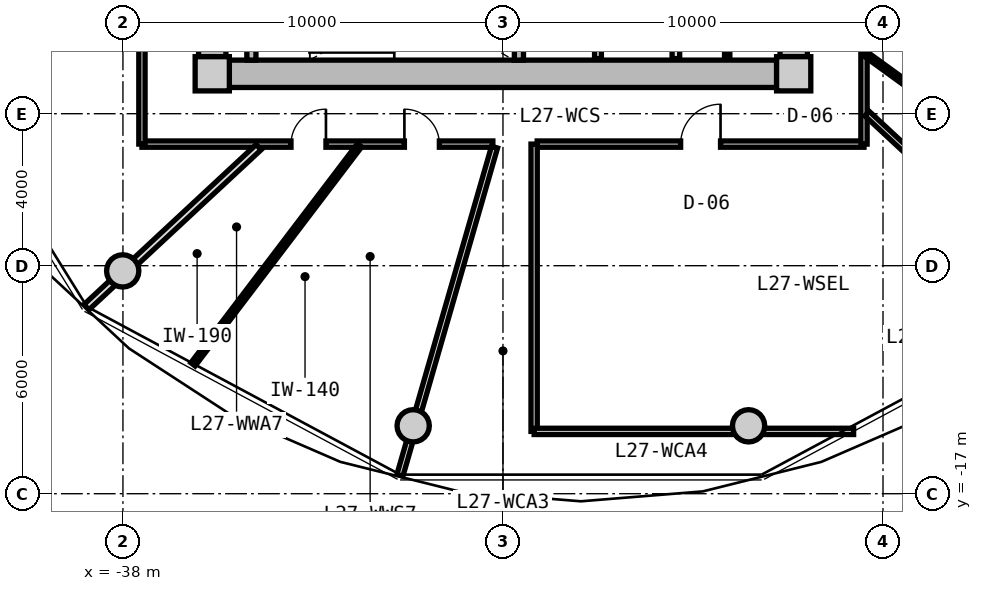
"""IFC4 building model, lengths in metres.
Left out: names, types, materials, properties, quantities, classifications, styles, units other than length and angle.
Written with IfcOpenShell. Run it as: python <this file> out.ifc"""

import sys

from ifc_helpers import new_model, si_unit, direction, frame, frame_2d, origin, origin_2d, place, context, subcontext, project, spatial, rectangle, circle, extrude, source, transform, mapped, element, fill, save


model = new_model("IFC4")
c1 = context("Model", 3, precision=1e-05, world=origin(), true_north=direction((0.0, 1.0)))
c2 = subcontext(c1, "Body", "Model", "MODEL_VIEW")
j1 = project(units=[si_unit("LENGTHUNIT", "METRE"), si_unit("PLANEANGLEUNIT", "RADIAN")], contexts=[c1])
p1 = place(None, origin())
s1 = spatial("IfcSite", under=j1, at=p1, CompositionType="ELEMENT")
p2 = place(p1, origin())
s2 = spatial("IfcBuilding", under=s1, at=p2, CompositionType="ELEMENT")
p3 = place(p2, frame((0.0, 0.0, 90.15)))
s3 = spatial("IfcBuildingStorey", under=s2, at=p3, CompositionType="ELEMENT", Elevation=90.15)
m1 = source(origin(), c2, "Body", "SweptSolid", [
    extrude(rectangle(XDim=0.9, YDim=0.9, at=origin_2d()), origin(), (0.0, 0.0, 1.0), 3.05),
])
for number, where, z_axis, x_axis in (
    (1, (-35.65, -5.95, 0.0), (0.0, 0.0, 1.0), (1.0, 0.0, 0.0)),
    (2, (-20.35, -5.95, 0.0), (0.0, 0.0, 1.0), (1.0, 0.0, 0.0)),
):
    element("IfcColumn", number, at=place(p3, frame(where, z_axis=z_axis, x_axis=x_axis)), inside=s3, PredefinedType="COLUMN", context=c2, shape_type="MappedRepresentation", body=[
        mapped(m1, transform((0.0, 0.0, 0.0), x_axis=(1.0, 0.0, 0.0), y_axis=(0.0, 1.0, 0.0), z_axis=(0.0, 0.0, 1.0), scale=1.0)),
    ])
m2 = source(origin(), c2, "Body", "SweptSolid", [
    extrude(rectangle(XDim=14.4, YDim=0.72, at=frame_2d((7.2, 0.0))), origin(), (0.0, 0.0, 1.0), 2.79),
])
p4 = place(p3, frame((-20.8, -5.95, 0.0), z_axis=(0.0, 0.0, 1.0), x_axis=(-1.0, 0.0, 0.0)))
e3 = element("IfcWall", 3, at=p4, inside=s3, PredefinedType="SHEAR", context=c2, shape_type="MappedRepresentation", body=[
    mapped(m2, transform((0.0, 0.0, 0.0), x_axis=(1.0, 0.0, 0.0), y_axis=(0.0, 1.0, 0.0), z_axis=(0.0, 0.0, 1.0), scale=1.0)),
])
m3 = source(origin(), c2, "Body", "SweptSolid", [
    extrude(rectangle(XDim=11.0, YDim=0.72, at=frame_2d((5.5, 0.0))), origin(), (0.0, 0.0, 1.0), 2.79),
])
p5 = place(p3, frame((-35.65, -5.5, 0.0), z_axis=(0.0, 0.0, 1.0), x_axis=(0.0, 1.0, 0.0)))
e4 = element("IfcWall", 4, at=p5, inside=s3, PredefinedType="SHEAR", context=c2, shape_type="MappedRepresentation", body=[
    mapped(m3, transform((0.0, 0.0, 0.0), x_axis=(1.0, 0.0, 0.0), y_axis=(0.0, 1.0, 0.0), z_axis=(0.0, 0.0, 1.0), scale=1.0)),
])
p6 = place(p5, frame((3.8, 0.0, 0.0)))
e5 = element("IfcOpeningElement", 5, at=p6, cuts=e4, PredefinedType="OPENING", context=c2, shape_type="SweptSolid", body=[
    extrude(rectangle(XDim=1.2, YDim=2.15, at=frame_2d((0.6, 1.075))), frame((0.0, 0.37, 0.0), z_axis=(0.0, -1.0, 0.0), x_axis=(1.0, 0.0, 0.0)), (0.0, 0.0, 1.0), 0.74),
])
p7 = place(p3, frame((-20.35, 5.5, 0.0), z_axis=(0.0, 0.0, 1.0), x_axis=(0.0, -1.0, 0.0)))
e6 = element("IfcWall", 6, at=p7, inside=s3, PredefinedType="SHEAR", context=c2, shape_type="MappedRepresentation", body=[
    mapped(m3, transform((0.0, 0.0, 0.0), x_axis=(1.0, 0.0, 0.0), y_axis=(0.0, 1.0, 0.0), z_axis=(0.0, 0.0, 1.0), scale=1.0)),
])
p8 = place(p7, frame((5.65, 0.0, 0.0)))
e7 = element("IfcOpeningElement", 7, at=p8, cuts=e6, PredefinedType="OPENING", context=c2, shape_type="SweptSolid", body=[
    extrude(rectangle(XDim=1.2, YDim=2.15, at=frame_2d((0.6, 1.075))), frame((0.0, 0.37, 0.0), z_axis=(0.0, -1.0, 0.0), x_axis=(1.0, 0.0, 0.0)), (0.0, 0.0, 1.0), 0.74),
])
m4 = source(origin(), c2, "Body", "SweptSolid", [
    extrude(circle(Radius=0.425, at=origin_2d()), origin(), (0.0, 0.0, 1.0), 3.05),
])
for number, where, z_axis, x_axis in (
    (8, (-38.006, -11.137, 0.0), (0.0, 0.0, 1.0), (1.0, 0.0, 0.0)),
    (9, (-30.363, -15.213, 0.0), (0.0, 0.0, 1.0), (1.0, 0.0, 0.0)),
    (10, (-21.537, -15.213, 0.0), (0.0, 0.0, 1.0), (1.0, 0.0, 0.0)),
):
    element("IfcColumn", number, at=place(p3, frame(where, z_axis=z_axis, x_axis=x_axis)), inside=s3, PredefinedType="COLUMN", context=c2, shape_type="MappedRepresentation", body=[
        mapped(m4, transform((0.0, 0.0, 0.0), x_axis=(1.0, 0.0, 0.0), y_axis=(0.0, 1.0, 0.0), z_axis=(0.0, 0.0, 1.0), scale=1.0)),
    ])
m5 = source(origin(), c2, "Body", "SweptSolid", [
    extrude(rectangle(XDim=3.14, YDim=0.24, at=frame_2d((1.57, 0.0))), origin(), (0.0, 0.0, 1.0), 2.79),
])
for number, where, z_axis, x_axis in (
    (11, (-34.62, -5.59, 0.0), (0.0, 0.0, 1.0), (0.0, 1.0, 0.0)),
    (12, (-27.58, -5.59, 0.0), (0.0, 0.0, 1.0), (0.0, 1.0, 0.0)),
):
    element("IfcWall", number, at=place(p3, frame(where, z_axis=z_axis, x_axis=x_axis)), inside=s3, PredefinedType="PARTITIONING", context=c2, shape_type="MappedRepresentation", body=[
        mapped(m5, transform((0.0, 0.0, 0.0), x_axis=(1.0, 0.0, 0.0), y_axis=(0.0, 1.0, 0.0), z_axis=(0.0, 0.0, 1.0), scale=1.0)),
    ])
m6 = source(origin(), c2, "Body", "SweptSolid", [
    extrude(rectangle(XDim=3.8, YDim=0.2, at=frame_2d((1.9, 0.0))), origin(), (0.0, 0.0, 1.0), 2.775),
])
p9 = place(p3, frame((-23.45, -5.55, 0.0), z_axis=(0.0, 0.0, 1.0), x_axis=(0.0, 1.0, 0.0)))
e13 = element("IfcWall", 13, at=p9, inside=s3, PredefinedType="PARTITIONING", context=c2, shape_type="MappedRepresentation", body=[
    mapped(m6, transform((0.0, 0.0, 0.0), x_axis=(1.0, 0.0, 0.0), y_axis=(0.0, 1.0, 0.0), z_axis=(0.0, 0.0, 1.0), scale=1.0)),
])
m7 = source(origin(), c2, "Body", "SweptSolid", [
    extrude(rectangle(XDim=3.22, YDim=0.18, at=frame_2d((1.61, 0.0))), origin(), (0.0, 0.0, 1.0), 2.775),
])
p10 = place(p3, frame((-25.5, -5.55, 0.0), z_axis=(0.0, 0.0, 1.0), x_axis=(0.0, 1.0, 0.0)))
e14 = element("IfcWall", 14, at=p10, inside=s3, PredefinedType="PARTITIONING", context=c2, shape_type="MappedRepresentation", body=[
    mapped(m7, transform((0.0, 0.0, 0.0), x_axis=(1.0, 0.0, 0.0), y_axis=(0.0, 1.0, 0.0), z_axis=(0.0, 0.0, 1.0), scale=1.0)),
])
m8 = source(origin(), c2, "Body", "SweptSolid", [
    extrude(rectangle(XDim=3.8, YDim=0.14, at=frame_2d((1.9, 0.0))), origin(), (0.0, 0.0, 1.0), 2.775),
])
p11 = place(p3, frame((-22.1, -5.55, 0.0), z_axis=(0.0, 0.0, 1.0), x_axis=(0.0, 1.0, 0.0)))
e15 = element("IfcWall", 15, at=p11, inside=s3, PredefinedType="PARTITIONING", context=c2, shape_type="MappedRepresentation", body=[
    mapped(m8, transform((0.0, 0.0, 0.0), x_axis=(1.0, 0.0, 0.0), y_axis=(0.0, 1.0, 0.0), z_axis=(0.0, 0.0, 1.0), scale=1.0)),
])
m9 = source(origin(), c2, "Body", "SweptSolid", [
    extrude(rectangle(XDim=8.6, YDim=0.165, at=frame_2d((4.3, 0.0))), origin(), (0.0, 0.0, 1.0), 2.775),
])
p12 = place(p3, frame((-18.5, -7.8, 0.0), z_axis=(0.0, 0.0, 1.0), x_axis=(-1.0, 0.0, 0.0)))
e16 = element("IfcWall", 16, at=p12, inside=s3, PredefinedType="PARTITIONING", context=c2, shape_type="MappedRepresentation", body=[
    mapped(m9, transform((0.0, 0.0, 0.0), x_axis=(1.0, 0.0, 0.0), y_axis=(0.0, 1.0, 0.0), z_axis=(0.0, 0.0, 1.0), scale=1.0)),
])
p13 = place(p12, frame((3.775, 0.0, 0.0)))
e17 = element("IfcOpeningElement", 17, at=p13, cuts=e16, PredefinedType="OPENING", context=c2, shape_type="SweptSolid", body=[
    extrude(rectangle(XDim=1.05, YDim=2.15, at=frame_2d((0.525, 1.075))), frame((0.0, 0.093, 0.0), z_axis=(0.0, -1.0, 0.0), x_axis=(1.0, 0.0, 0.0)), (0.0, 0.0, 1.0), 0.185),
])
m10 = source(origin(), c2, "Body", "SweptSolid", [
    extrude(rectangle(XDim=9.234, YDim=0.165, at=frame_2d((4.617, 0.0))), origin(), (0.0, 0.0, 1.0), 2.775),
])
p14 = place(p3, frame((-28.266, -7.8, 0.0), z_axis=(0.0, 0.0, 1.0), x_axis=(-1.0, 0.0, 0.0)))
e18 = element("IfcWall", 18, at=p14, inside=s3, PredefinedType="PARTITIONING", context=c2, shape_type="MappedRepresentation", body=[
    mapped(m10, transform((0.0, 0.0, 0.0), x_axis=(1.0, 0.0, 0.0), y_axis=(0.0, 1.0, 0.0), z_axis=(0.0, 0.0, 1.0), scale=1.0)),
])
p15 = place(p14, frame((4.392, 0.0, 0.0)))
e19 = element("IfcOpeningElement", 19, at=p15, cuts=e18, PredefinedType="OPENING", context=c2, shape_type="SweptSolid", body=[
    extrude(rectangle(XDim=0.92, YDim=2.1, at=frame_2d((0.46, 1.05))), frame((0.0, 0.093, 0.0), z_axis=(0.0, -1.0, 0.0), x_axis=(1.0, 0.0, 0.0)), (0.0, 0.0, 1.0), 0.185),
])
p16 = place(p14, frame((1.408, 0.0, 0.0)))
e20 = element("IfcOpeningElement", 20, at=p16, cuts=e18, PredefinedType="OPENING", context=c2, shape_type="SweptSolid", body=[
    extrude(rectangle(XDim=0.92, YDim=2.1, at=frame_2d((0.46, 1.05))), frame((0.0, 0.093, 0.0), z_axis=(0.0, -1.0, 0.0), x_axis=(1.0, 0.0, 0.0)), (0.0, 0.0, 1.0), 0.185),
])
m11 = source(origin(), c2, "Body", "SweptSolid", [
    extrude(rectangle(XDim=15.6, YDim=0.165, at=frame_2d((7.8, 0.0))), origin(), (0.0, 0.0, 1.0), 2.775),
])
p17 = place(p3, frame((-37.5, -7.8, 0.0), z_axis=(0.0, 0.0, 1.0), x_axis=(0.0, 1.0, 0.0)))
e21 = element("IfcWall", 21, at=p17, inside=s3, PredefinedType="PARTITIONING", context=c2, shape_type="MappedRepresentation", body=[
    mapped(m11, transform((0.0, 0.0, 0.0), x_axis=(1.0, 0.0, 0.0), y_axis=(0.0, 1.0, 0.0), z_axis=(0.0, 0.0, 1.0), scale=1.0)),
])
p18 = place(p17, frame((7.175, 0.0, 0.0)))
e22 = element("IfcOpeningElement", 22, at=p18, cuts=e21, PredefinedType="OPENING", context=c2, shape_type="SweptSolid", body=[
    extrude(rectangle(XDim=1.25, YDim=2.2, at=frame_2d((0.625, 1.1))), frame((0.0, 0.093, 0.0), z_axis=(0.0, -1.0, 0.0), x_axis=(1.0, 0.0, 0.0)), (0.0, 0.0, 1.0), 0.185),
])
p19 = place(p3, frame((-18.5, 7.8, 0.0), z_axis=(0.0, 0.0, 1.0), x_axis=(0.0, -1.0, 0.0)))
e23 = element("IfcWall", 23, at=p19, inside=s3, PredefinedType="PARTITIONING", context=c2, shape_type="MappedRepresentation", body=[
    mapped(m11, transform((0.0, 0.0, 0.0), x_axis=(1.0, 0.0, 0.0), y_axis=(0.0, 1.0, 0.0), z_axis=(0.0, 0.0, 1.0), scale=1.0)),
])
p20 = place(p19, frame((12.002, 0.0, 0.0)))
e24 = element("IfcOpeningElement", 24, at=p20, cuts=e23, PredefinedType="OPENING", context=c2, shape_type="SweptSolid", body=[
    extrude(rectangle(XDim=1.05, YDim=2.15, at=frame_2d((0.525, 1.075))), frame((0.0, 0.093, 0.0), z_axis=(0.0, -1.0, 0.0), x_axis=(1.0, 0.0, 0.0)), (0.0, 0.0, 1.0), 0.185),
])
p21 = place(p19, frame((10.211, 0.0, 0.0)))
e25 = element("IfcOpeningElement", 25, at=p21, cuts=e23, PredefinedType="OPENING", context=c2, shape_type="SweptSolid", body=[
    extrude(rectangle(XDim=1.05, YDim=2.15, at=frame_2d((0.525, 1.075))), frame((0.0, 0.093, 0.0), z_axis=(0.0, -1.0, 0.0), x_axis=(1.0, 0.0, 0.0)), (0.0, 0.0, 1.0), 0.185),
])
p22 = place(p19, frame((7.722, 0.0, 0.0)))
e26 = element("IfcOpeningElement", 26, at=p22, cuts=e23, PredefinedType="OPENING", context=c2, shape_type="SweptSolid", body=[
    extrude(rectangle(XDim=1.05, YDim=2.15, at=frame_2d((0.525, 1.075))), frame((0.0, 0.093, 0.0), z_axis=(0.0, -1.0, 0.0), x_axis=(1.0, 0.0, 0.0)), (0.0, 0.0, 1.0), 0.185),
])
p23 = place(p19, frame((6.291, 0.0, 0.0)))
e27 = element("IfcOpeningElement", 27, at=p23, cuts=e23, PredefinedType="OPENING", context=c2, shape_type="SweptSolid", body=[
    extrude(rectangle(XDim=1.05, YDim=2.15, at=frame_2d((0.525, 1.075))), frame((0.0, 0.093, 0.0), z_axis=(0.0, -1.0, 0.0), x_axis=(1.0, 0.0, 0.0)), (0.0, 0.0, 1.0), 0.185),
])
p24 = place(p19, frame((4.296, 0.0, 0.0)))
e28 = element("IfcOpeningElement", 28, at=p24, cuts=e23, PredefinedType="OPENING", context=c2, shape_type="SweptSolid", body=[
    extrude(rectangle(XDim=1.05, YDim=2.15, at=frame_2d((0.525, 1.075))), frame((0.0, 0.093, 0.0), z_axis=(0.0, -1.0, 0.0), x_axis=(1.0, 0.0, 0.0)), (0.0, 0.0, 1.0), 0.185),
])
p25 = place(p19, frame((1.654, 0.0, 0.0)))
e29 = element("IfcOpeningElement", 29, at=p25, cuts=e23, PredefinedType="OPENING", context=c2, shape_type="SweptSolid", body=[
    extrude(rectangle(XDim=1.05, YDim=2.15, at=frame_2d((0.525, 1.075))), frame((0.0, 0.093, 0.0), z_axis=(0.0, -1.0, 0.0), x_axis=(1.0, 0.0, 0.0)), (0.0, 0.0, 1.0), 0.185),
])
m12 = source(origin(), c2, "Body", "SweptSolid", [
    extrude(rectangle(XDim=8.989, YDim=0.165, at=frame_2d((4.495, 0.0))), origin(), (0.0, 0.0, 1.0), 2.275),
])
p26 = place(p3, frame((-28.222, -7.88, 0.0), z_axis=(0.0, 0.0, 1.0), x_axis=(-0.27702323008, -0.960863221274, 0.0)))
e30 = element("IfcWall", 30, at=p26, inside=s3, PredefinedType="PARTITIONING", context=c2, shape_type="MappedRepresentation", body=[
    mapped(m12, transform((0.0, 0.0, 0.0), x_axis=(1.0, 0.0, 0.0), y_axis=(0.0, 1.0, 0.0), z_axis=(0.0, 0.0, 1.0), scale=1.0)),
])
m13 = source(origin(), c2, "Body", "SweptSolid", [
    extrude(rectangle(XDim=7.482, YDim=0.165, at=frame_2d((3.741, 0.0))), origin(), (0.0, 0.0, 1.0), 2.275),
])
p27 = place(p3, frame((-18.42, -6.998, 0.0), z_axis=(0.0, 0.0, 1.0), x_axis=(0.732508698043, -0.680757671489, 0.0)))
e31 = element("IfcWall", 31, at=p27, inside=s3, PredefinedType="PARTITIONING", context=c2, shape_type="MappedRepresentation", body=[
    mapped(m13, transform((0.0, 0.0, 0.0), x_axis=(1.0, 0.0, 0.0), y_axis=(0.0, 1.0, 0.0), z_axis=(0.0, 0.0, 1.0), scale=1.0)),
])
m14 = source(origin(), c2, "Body", "SweptSolid", [
    extrude(rectangle(XDim=7.56, YDim=0.165, at=frame_2d((3.78, 0.0))), origin(), (0.0, 0.0, 1.0), 2.775),
])
p28 = place(p3, frame((-27.18, -15.36, 0.0), z_axis=(0.0, 0.0, 1.0), x_axis=(0.0, 1.0, 0.0)))
e32 = element("IfcWall", 32, at=p28, inside=s3, PredefinedType="PARTITIONING", context=c2, shape_type="MappedRepresentation", body=[
    mapped(m14, transform((0.0, 0.0, 0.0), x_axis=(1.0, 0.0, 0.0), y_axis=(0.0, 1.0, 0.0), z_axis=(0.0, 0.0, 1.0), scale=1.0)),
])
m15 = source(origin(), c2, "Body", "SweptSolid", [
    extrude(rectangle(XDim=8.407, YDim=0.165, at=frame_2d((4.204, 0.0))), origin(), (0.0, 0.0, 1.0), 2.275),
])
p29 = place(p3, frame((-27.18, -15.36, 0.0), z_axis=(0.0, 0.0, 1.0), x_axis=(1.0, 0.0, 0.0)))
e33 = element("IfcWall", 33, at=p29, inside=s3, PredefinedType="PARTITIONING", context=c2, shape_type="MappedRepresentation", body=[
    mapped(m15, transform((0.0, 0.0, 0.0), x_axis=(1.0, 0.0, 0.0), y_axis=(0.0, 1.0, 0.0), z_axis=(0.0, 0.0, 1.0), scale=1.0)),
])
m16 = source(origin(), c2, "Body", "SweptSolid", [
    extrude(rectangle(XDim=6.187, YDim=0.19, at=frame_2d((3.093, 0.0))), origin(), (0.0, 0.0, 1.0), 2.275),
])
p30 = place(p3, frame((-34.429, -7.88, 0.0), z_axis=(0.0, 0.0, 1.0), x_axis=(-0.732501077882, -0.680765870841, 0.0)))
e34 = element("IfcWall", 34, at=p30, inside=s3, PredefinedType="PARTITIONING", context=c2, shape_type="MappedRepresentation", body=[
    mapped(m16, transform((0.0, 0.0, 0.0), x_axis=(1.0, 0.0, 0.0), y_axis=(0.0, 1.0, 0.0), z_axis=(0.0, 0.0, 1.0), scale=1.0)),
])
m17 = source(origin(), c2, "Body", "SweptSolid", [
    extrude(rectangle(XDim=7.243, YDim=0.14, at=frame_2d((3.621, 0.0))), origin(), (0.0, 0.0, 1.0), 2.775),
])
p31 = place(p3, frame((-31.774, -7.83, 0.0), z_axis=(0.0, 0.0, 1.0), x_axis=(-0.605111472002, -0.796140757939, 0.0)))
e35 = element("IfcWall", 35, at=p31, inside=s3, PredefinedType="PARTITIONING", context=c2, shape_type="MappedRepresentation", body=[
    mapped(m17, transform((0.0, 0.0, 0.0), x_axis=(1.0, 0.0, 0.0), y_axis=(0.0, 1.0, 0.0), z_axis=(0.0, 0.0, 1.0), scale=1.0)),
])
m18 = source(origin(), c2, "Body", "SweptSolid", [
    extrude(rectangle(XDim=8.744, YDim=0.19, at=frame_2d((4.372, 0.0))), origin(), (0.0, 0.0, 1.0), 2.775),
])
p32 = place(p3, frame((-18.273, -4.142, 0.0), z_axis=(0.0, 0.0, 1.0), x_axis=(0.882252449936, -0.470776607938, 0.0)))
e36 = element("IfcWall", 36, at=p32, inside=s3, PredefinedType="PARTITIONING", context=c2, shape_type="MappedRepresentation", body=[
    mapped(m18, transform((0.0, 0.0, 0.0), x_axis=(1.0, 0.0, 0.0), y_axis=(0.0, 1.0, 0.0), z_axis=(0.0, 0.0, 1.0), scale=1.0)),
])
m19 = source(origin(), c2, "Body", "SweptSolid", [
    extrude(rectangle(XDim=3.621, YDim=0.14, at=frame_2d((1.811, 0.0))), origin(), (0.0, 0.0, 1.0), 2.775),
])
p33 = place(p3, frame((-18.47, -5.422, 0.0), z_axis=(0.0, 0.0, 1.0), x_axis=(0.80968252222, -0.586868139544, 0.0)))
e37 = element("IfcWall", 37, at=p33, inside=s3, PredefinedType="PARTITIONING", context=c2, shape_type="MappedRepresentation", body=[
    mapped(m19, transform((0.0, 0.0, 0.0), x_axis=(1.0, 0.0, 0.0), y_axis=(0.0, 1.0, 0.0), z_axis=(0.0, 0.0, 1.0), scale=1.0)),
])
p34 = place(p33, frame((1.351, 0.0, 0.0)))
e38 = element("IfcOpeningElement", 38, at=p34, cuts=e37, PredefinedType="OPENING", context=c2, shape_type="SweptSolid", body=[
    extrude(rectangle(XDim=0.92, YDim=2.1, at=frame_2d((0.46, 1.05))), frame((0.0, 0.08, 0.0), z_axis=(0.0, -1.0, 0.0), x_axis=(1.0, 0.0, 0.0)), (0.0, 0.0, 1.0), 0.16),
])
m20 = source(origin(), c2, "Body", "SweptSolid", [
    extrude(rectangle(XDim=1.05, YDim=2.15, at=frame_2d((0.525, 1.075))), frame((0.0, 0.025, 0.0), z_axis=(0.0, -1.0, 0.0), x_axis=(1.0, 0.0, 0.0)), (0.0, 0.0, 1.0), 0.05),
])
p35 = place(p13, frame((1.05, 0.0, 0.0), z_axis=(0.0, 0.0, 1.0), x_axis=(-1.0, 0.0, 0.0)))
e39 = element("IfcDoor", 39, at=p35, inside=s3, OperationType="SINGLE_SWING_RIGHT", PredefinedType="DOOR", context=c2, shape_type="MappedRepresentation", body=[
    mapped(m20, transform((0.0, 0.0, 0.0), x_axis=(1.0, 0.0, 0.0), y_axis=(0.0, 1.0, 0.0), z_axis=(0.0, 0.0, 1.0), scale=1.0)),
])
fill(e17, e39)
m21 = source(origin(), c2, "Body", "SweptSolid", [
    extrude(rectangle(XDim=0.92, YDim=2.1, at=frame_2d((0.46, 1.05))), frame((0.0, 0.025, 0.0), z_axis=(0.0, -1.0, 0.0), x_axis=(1.0, 0.0, 0.0)), (0.0, 0.0, 1.0), 0.05),
])
p36 = place(p15, frame((0.92, 0.0, 0.0), z_axis=(0.0, 0.0, 1.0), x_axis=(-1.0, 0.0, 0.0)))
e40 = element("IfcDoor", 40, at=p36, inside=s3, OperationType="SINGLE_SWING_RIGHT", PredefinedType="DOOR", context=c2, shape_type="MappedRepresentation", body=[
    mapped(m21, transform((0.0, 0.0, 0.0), x_axis=(1.0, 0.0, 0.0), y_axis=(0.0, 1.0, 0.0), z_axis=(0.0, 0.0, 1.0), scale=1.0)),
])
fill(e19, e40)
p37 = place(p16, frame((0.92, 0.0, 0.0), z_axis=(0.0, 0.0, 1.0), x_axis=(-1.0, 0.0, 0.0)))
e41 = element("IfcDoor", 41, at=p37, inside=s3, OperationType="SINGLE_SWING_LEFT", PredefinedType="DOOR", context=c2, shape_type="MappedRepresentation", body=[
    mapped(m21, transform((0.0, 0.0, 0.0), x_axis=(1.0, 0.0, 0.0), y_axis=(0.0, 1.0, 0.0), z_axis=(0.0, 0.0, 1.0), scale=1.0)),
])
fill(e20, e41)
save(model, sys.argv[1])
